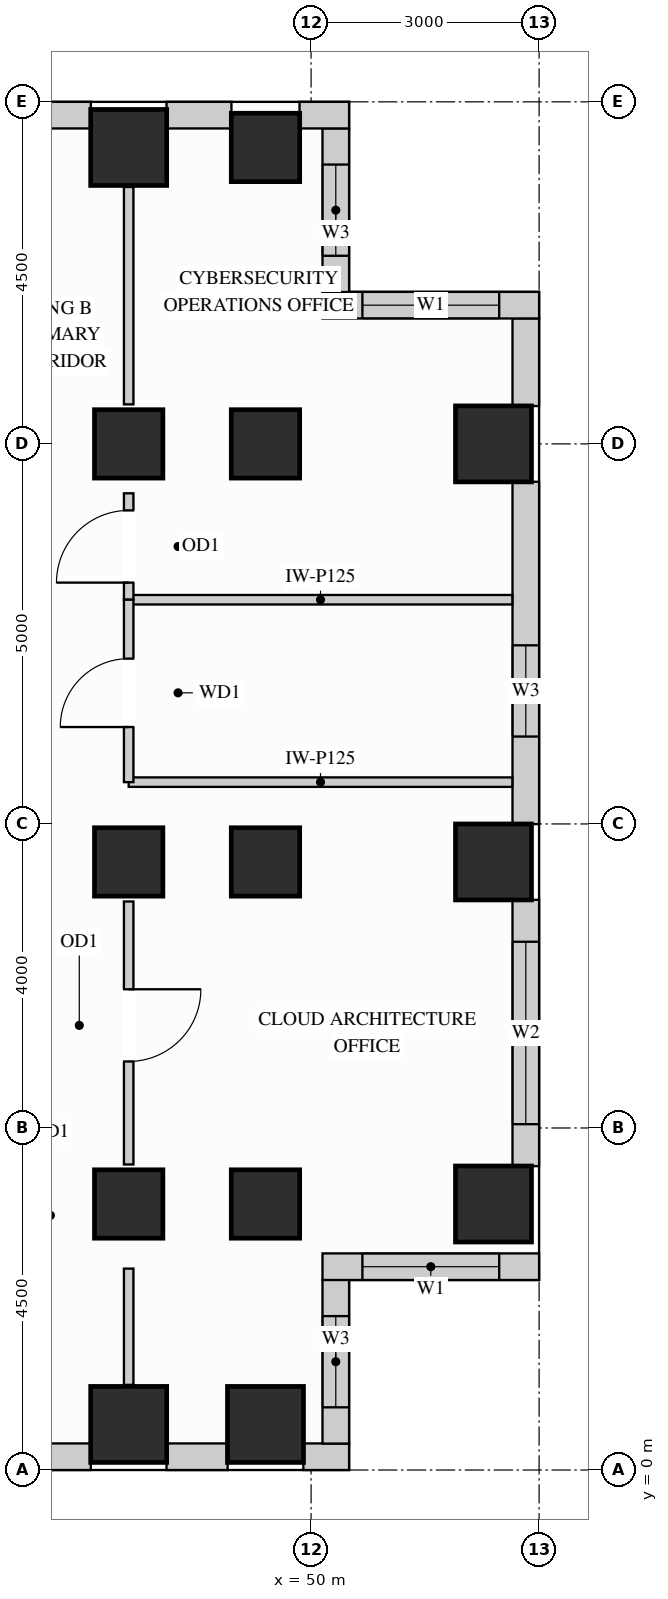
"""IFC4 building model, lengths in metres.
Left out: names, types, materials, properties, quantities, classifications, styles, units other than length and angle.
Written with IfcOpenShell. Run it as: python <this file> out.ifc"""

import sys

from ifc_helpers import new_model, si_unit, direction, frame, frame_2d, origin, origin_2d, place, context, subcontext, project, spatial, rectangle, extrude, source, transform, mapped, element, fill, save


model = new_model("IFC4")
c1 = context("Model", 3, precision=1e-05, world=origin(), true_north=direction((0.0, 1.0)))
c2 = subcontext(c1, "Body", "Model", "MODEL_VIEW")
j1 = project(units=[si_unit("LENGTHUNIT", "METRE"), si_unit("PLANEANGLEUNIT", "RADIAN")], contexts=[c1])
p1 = place(None, origin())
s1 = spatial("IfcSite", under=j1, at=p1, CompositionType="ELEMENT")
p2 = place(p1, origin())
s2 = spatial("IfcBuilding", under=s1, at=p2, CompositionType="ELEMENT")
p3 = place(p2, frame((0.0, 0.0, 143.1)))
s3 = spatial("IfcBuildingStorey", under=s2, at=p3, CompositionType="ELEMENT", Elevation=143.1)
m1 = source(origin(), c2, "Body", "SweptSolid", [
    extrude(rectangle(XDim=0.9, YDim=0.9, at=origin_2d()), origin(), (0.0, 0.0, 1.0), 3.4),
])
for number, where, z_axis, x_axis in (
    (1, (47.6, 13.5, 0.0), (0.0, 0.0, 1.0), (1.0, 0.0, 0.0)),
    (2, (47.6, 3.5, 0.0), (0.0, 0.0, 1.0), (1.0, 0.0, 0.0)),
    (3, (47.6, 8.0, 0.0), (0.0, 0.0, 1.0), (1.0, 0.0, 0.0)),
    (4, (49.4, 13.5, 0.0), (0.0, 0.0, 1.0), (1.0, 0.0, 0.0)),
    (5, (49.4, 17.4, 0.0), (0.0, 0.0, 1.0), (1.0, 0.0, 0.0)),
    (6, (49.4, 3.5, 0.0), (0.0, 0.0, 1.0), (1.0, 0.0, 0.0)),
    (7, (49.4, 8.0, 0.0), (0.0, 0.0, 1.0), (1.0, 0.0, 0.0)),
):
    element("IfcColumn", number, at=place(p3, frame(where, z_axis=z_axis, x_axis=x_axis)), inside=s3, PredefinedType="COLUMN", context=c2, shape_type="MappedRepresentation", body=[
        mapped(m1, transform((0.0, 0.0, 0.0), x_axis=(1.0, 0.0, 0.0), y_axis=(0.0, 1.0, 0.0), z_axis=(0.0, 0.0, 1.0))),
    ])
m2 = source(origin(), c2, "Body", "SweptSolid", [
    extrude(rectangle(XDim=1.0, YDim=1.0, at=origin_2d()), origin(), (0.0, 0.0, 1.0), 3.4),
])
for number, where, z_axis, x_axis in (
    (8, (47.6, 17.4, 0.0), (0.0, 0.0, 1.0), (1.0, 0.0, 0.0)),
    (9, (52.4, 13.5, 0.0), (0.0, 0.0, 1.0), (1.0, 0.0, 0.0)),
    (10, (52.4, 3.5, 0.0), (0.0, 0.0, 1.0), (1.0, 0.0, 0.0)),
    (11, (52.4, 8.0, 0.0), (0.0, 0.0, 1.0), (1.0, 0.0, 0.0)),
    (12, (47.6, 0.6, 0.0), (0.0, 0.0, 1.0), (1.0, 0.0, 0.0)),
    (13, (49.4, 0.6, 0.0), (0.0, 0.0, 1.0), (1.0, 0.0, 0.0)),
):
    element("IfcColumn", number, at=place(p3, frame(where, z_axis=z_axis, x_axis=x_axis)), inside=s3, PredefinedType="COLUMN", context=c2, shape_type="MappedRepresentation", body=[
        mapped(m2, transform((0.0, 0.0, 0.0), x_axis=(1.0, 0.0, 0.0), y_axis=(0.0, 1.0, 0.0), z_axis=(0.0, 0.0, 1.0))),
    ])
p4 = place(p3, frame((40.498, 0.175, 0.0), z_axis=(0.0, 0.0, 1.0), x_axis=(1.0, 0.0, 0.0)))
e14 = element("IfcWall", 14, at=p4, inside=s3, PredefinedType="SOLIDWALL", context=c2, shape_type="SweptSolid", body=[
    extrude(rectangle(XDim=6.604, YDim=0.35, at=frame_2d((3.302, 0.0))), origin(), (0.0, 0.0, 1.0), 2.612),
])
p5 = place(p4, frame((0.737, 0.0, 0.78)))
e15 = element("IfcOpeningElement", 15, at=p5, cuts=e14, PredefinedType="OPENING", context=c2, shape_type="SweptSolid", body=[
    extrude(rectangle(XDim=1.8, YDim=1.652, at=frame_2d((0.9, 0.826))), frame((0.0, 0.185, 0.0), z_axis=(0.0, -1.0, 0.0), x_axis=(1.0, 0.0, 0.0)), (0.0, 0.0, 1.0), 0.37),
])
p6 = place(p4, frame((2.955, 0.0, 0.78)))
e16 = element("IfcOpeningElement", 16, at=p6, cuts=e14, PredefinedType="OPENING", context=c2, shape_type="SweptSolid", body=[
    extrude(rectangle(XDim=1.8, YDim=1.652, at=frame_2d((0.9, 0.826))), frame((0.0, 0.185, 0.0), z_axis=(0.0, -1.0, 0.0), x_axis=(1.0, 0.0, 0.0)), (0.0, 0.0, 1.0), 0.37),
])
m3 = source(origin(), c2, "Body", "SweptSolid", [
    extrude(rectangle(XDim=0.804, YDim=0.35, at=frame_2d((0.402, 0.0))), origin(), (0.0, 0.0, 1.0), 3.385),
])
p7 = place(p3, frame((48.098, 0.175, 0.0), z_axis=(0.0, 0.0, 1.0), x_axis=(1.0, 0.0, 0.0)))
e17 = element("IfcWall", 17, at=p7, inside=s3, PredefinedType="SOLIDWALL", context=c2, shape_type="MappedRepresentation", body=[
    mapped(m3, transform((0.0, 0.0, 0.0), x_axis=(1.0, 0.0, 0.0), y_axis=(0.0, 1.0, 0.0), z_axis=(0.0, 0.0, 1.0))),
])
m4 = source(origin(), c2, "Body", "SweptSolid", [
    extrude(rectangle(XDim=0.602, YDim=0.35, at=frame_2d((0.301, 0.0))), origin(), (0.0, 0.0, 1.0), 3.385),
])
p8 = place(p3, frame((49.898, 0.175, 0.0), z_axis=(0.0, 0.0, 1.0), x_axis=(1.0, 0.0, 0.0)))
e18 = element("IfcWall", 18, at=p8, inside=s3, PredefinedType="SOLIDWALL", context=c2, shape_type="MappedRepresentation", body=[
    mapped(m4, transform((0.0, 0.0, 0.0), x_axis=(1.0, 0.0, 0.0), y_axis=(0.0, 1.0, 0.0), z_axis=(0.0, 0.0, 1.0))),
])
p9 = place(p3, frame((50.325, 0.348, 0.0), z_axis=(0.0, 0.0, 1.0), x_axis=(0.0, 1.0, 0.0)))
e19 = element("IfcWall", 19, at=p9, inside=s3, PredefinedType="SOLIDWALL", context=c2, shape_type="SweptSolid", body=[
    extrude(rectangle(XDim=2.154, YDim=0.35, at=frame_2d((1.077, 0.0))), origin(), (0.0, 0.0, 1.0), 3.385),
])
p10 = place(p9, frame((0.477, 0.0, 0.78)))
e20 = element("IfcOpeningElement", 20, at=p10, cuts=e19, PredefinedType="OPENING", context=c2, shape_type="SweptSolid", body=[
    extrude(rectangle(XDim=1.2, YDim=2.1, at=frame_2d((0.6, 1.05))), frame((0.0, 0.185, 0.0), z_axis=(0.0, -1.0, 0.0), x_axis=(1.0, 0.0, 0.0)), (0.0, 0.0, 1.0), 0.37),
])
p11 = place(p3, frame((50.15, 2.675, 0.0), z_axis=(0.0, 0.0, 1.0), x_axis=(1.0, 0.0, 0.0)))
e21 = element("IfcWall", 21, at=p11, inside=s3, PredefinedType="SOLIDWALL", context=c2, shape_type="SweptSolid", body=[
    extrude(rectangle(XDim=2.85, YDim=0.35, at=frame_2d((1.425, 0.0))), origin(), (0.0, 0.0, 1.0), 3.385),
])
p12 = place(p11, frame((0.525, 0.0, 0.78)))
e22 = element("IfcOpeningElement", 22, at=p12, cuts=e21, PredefinedType="OPENING", context=c2, shape_type="SweptSolid", body=[
    extrude(rectangle(XDim=1.8, YDim=2.1, at=frame_2d((0.9, 1.05))), frame((0.0, 0.185, 0.0), z_axis=(0.0, -1.0, 0.0), x_axis=(1.0, 0.0, 0.0)), (0.0, 0.0, 1.0), 0.37),
])
p13 = place(p3, frame((52.825, 3.998, 0.0), z_axis=(0.0, 0.0, 1.0), x_axis=(0.0, 1.0, 0.0)))
e23 = element("IfcWall", 23, at=p13, inside=s3, PredefinedType="SOLIDWALL", context=c2, shape_type="SweptSolid", body=[
    extrude(rectangle(XDim=3.504, YDim=0.35, at=frame_2d((1.752, 0.0))), origin(), (0.0, 0.0, 1.0), 2.612),
])
p14 = place(p13, frame((0.552, 0.0, 0.78)))
e24 = element("IfcOpeningElement", 24, at=p14, cuts=e23, PredefinedType="OPENING", context=c2, shape_type="SweptSolid", body=[
    extrude(rectangle(XDim=2.4, YDim=1.652, at=frame_2d((1.2, 0.826))), frame((0.0, 0.185, 0.0), z_axis=(0.0, -1.0, 0.0), x_axis=(1.0, 0.0, 0.0)), (0.0, 0.0, 1.0), 0.37),
])
p15 = place(p3, frame((52.825, 8.498, 0.0), z_axis=(0.0, 0.0, 1.0), x_axis=(0.0, 1.0, 0.0)))
e25 = element("IfcWall", 25, at=p15, inside=s3, PredefinedType="SOLIDWALL", context=c2, shape_type="SweptSolid", body=[
    extrude(rectangle(XDim=4.504, YDim=0.35, at=frame_2d((2.252, 0.0))), origin(), (0.0, 0.0, 1.0), 2.612),
])
p16 = place(p15, frame((1.152, 0.0, 0.78)))
e26 = element("IfcOpeningElement", 26, at=p16, cuts=e25, PredefinedType="OPENING", context=c2, shape_type="SweptSolid", body=[
    extrude(rectangle(XDim=1.2, YDim=1.652, at=frame_2d((0.6, 0.826))), frame((0.0, 0.185, 0.0), z_axis=(0.0, -1.0, 0.0), x_axis=(1.0, 0.0, 0.0)), (0.0, 0.0, 1.0), 0.37),
])
m5 = source(origin(), c2, "Body", "SweptSolid", [
    extrude(rectangle(XDim=1.154, YDim=0.35, at=frame_2d((0.577, 0.0))), origin(), (0.0, 0.0, 1.0), 3.385),
])
p17 = place(p3, frame((52.825, 13.998, 0.0), z_axis=(0.0, 0.0, 1.0), x_axis=(0.0, 1.0, 0.0)))
e27 = element("IfcWall", 27, at=p17, inside=s3, PredefinedType="SOLIDWALL", context=c2, shape_type="MappedRepresentation", body=[
    mapped(m5, transform((0.0, 0.0, 0.0), x_axis=(1.0, 0.0, 0.0), y_axis=(0.0, 1.0, 0.0), z_axis=(0.0, 0.0, 1.0))),
])
p18 = place(p3, frame((53.0, 15.325, 0.0), z_axis=(0.0, 0.0, 1.0), x_axis=(-1.0, 0.0, 0.0)))
e28 = element("IfcWall", 28, at=p18, inside=s3, PredefinedType="SOLIDWALL", context=c2, shape_type="SweptSolid", body=[
    extrude(rectangle(XDim=2.85, YDim=0.35, at=frame_2d((1.425, 0.0))), origin(), (0.0, 0.0, 1.0), 3.385),
])
p19 = place(p18, frame((0.525, 0.0, 0.78)))
e29 = element("IfcOpeningElement", 29, at=p19, cuts=e28, PredefinedType="OPENING", context=c2, shape_type="SweptSolid", body=[
    extrude(rectangle(XDim=1.8, YDim=2.1, at=frame_2d((0.9, 1.05))), frame((0.0, 0.185, 0.0), z_axis=(0.0, -1.0, 0.0), x_axis=(1.0, 0.0, 0.0)), (0.0, 0.0, 1.0), 0.37),
])
p20 = place(p3, frame((50.325, 15.498, 0.0), z_axis=(0.0, 0.0, 1.0), x_axis=(0.0, 1.0, 0.0)))
e30 = element("IfcWall", 30, at=p20, inside=s3, PredefinedType="SOLIDWALL", context=c2, shape_type="SweptSolid", body=[
    extrude(rectangle(XDim=2.154, YDim=0.35, at=frame_2d((1.077, 0.0))), origin(), (0.0, 0.0, 1.0), 3.385),
])
p21 = place(p20, frame((0.477, 0.0, 0.78)))
e31 = element("IfcOpeningElement", 31, at=p21, cuts=e30, PredefinedType="OPENING", context=c2, shape_type="SweptSolid", body=[
    extrude(rectangle(XDim=1.2, YDim=2.1, at=frame_2d((0.6, 1.05))), frame((0.0, 0.185, 0.0), z_axis=(0.0, -1.0, 0.0), x_axis=(1.0, 0.0, 0.0)), (0.0, 0.0, 1.0), 0.37),
])
m6 = source(origin(), c2, "Body", "SweptSolid", [
    extrude(rectangle(XDim=0.652, YDim=0.35, at=frame_2d((0.326, 0.0))), origin(), (0.0, 0.0, 1.0), 3.385),
])
p22 = place(p3, frame((50.5, 17.825, 0.0), z_axis=(0.0, 0.0, 1.0), x_axis=(-1.0, 0.0, 0.0)))
e32 = element("IfcWall", 32, at=p22, inside=s3, PredefinedType="SOLIDWALL", context=c2, shape_type="MappedRepresentation", body=[
    mapped(m6, transform((0.0, 0.0, 0.0), x_axis=(1.0, 0.0, 0.0), y_axis=(0.0, 1.0, 0.0), z_axis=(0.0, 0.0, 1.0))),
])
m7 = source(origin(), c2, "Body", "SweptSolid", [
    extrude(rectangle(XDim=0.854, YDim=0.35, at=frame_2d((0.427, 0.0))), origin(), (0.0, 0.0, 1.0), 3.385),
])
p23 = place(p3, frame((48.952, 17.825, 0.0), z_axis=(0.0, 0.0, 1.0), x_axis=(-1.0, 0.0, 0.0)))
e33 = element("IfcWall", 33, at=p23, inside=s3, PredefinedType="SOLIDWALL", context=c2, shape_type="MappedRepresentation", body=[
    mapped(m7, transform((0.0, 0.0, 0.0), x_axis=(1.0, 0.0, 0.0), y_axis=(0.0, 1.0, 0.0), z_axis=(0.0, 0.0, 1.0))),
])
p24 = place(p3, frame((47.102, 17.825, 0.0), z_axis=(0.0, 0.0, 1.0), x_axis=(-1.0, 0.0, 0.0)))
e34 = element("IfcWall", 34, at=p24, inside=s3, PredefinedType="SOLIDWALL", context=c2, shape_type="SweptSolid", body=[
    extrude(rectangle(XDim=6.604, YDim=0.35, at=frame_2d((3.302, 0.0))), origin(), (0.0, 0.0, 1.0), 2.612),
])
p25 = place(p24, frame((1.849, 0.0, 0.78)))
e35 = element("IfcOpeningElement", 35, at=p25, cuts=e34, PredefinedType="OPENING", context=c2, shape_type="SweptSolid", body=[
    extrude(rectangle(XDim=1.8, YDim=1.652, at=frame_2d((0.9, 0.826))), frame((0.0, 0.185, 0.0), z_axis=(0.0, -1.0, 0.0), x_axis=(1.0, 0.0, 0.0)), (0.0, 0.0, 1.0), 0.37),
])
p26 = place(p24, frame((4.067, 0.0, 0.78)))
e36 = element("IfcOpeningElement", 36, at=p26, cuts=e34, PredefinedType="OPENING", context=c2, shape_type="SweptSolid", body=[
    extrude(rectangle(XDim=1.8, YDim=1.652, at=frame_2d((0.9, 0.826))), frame((0.0, 0.185, 0.0), z_axis=(0.0, -1.0, 0.0), x_axis=(1.0, 0.0, 0.0)), (0.0, 0.0, 1.0), 0.37),
])
m8 = source(origin(), c2, "Body", "SweptSolid", [
    extrude(rectangle(XDim=5.048, YDim=0.125, at=frame_2d((2.524, 0.0))), origin(), (0.0, 0.0, 1.0), 3.385),
])
for number, where, z_axis, x_axis in (
    (37, (47.6, 11.45, 0.0), (0.0, 0.0, 1.0), (1.0, 0.0, 0.0)),
    (38, (47.6, 9.05, 0.0), (0.0, 0.0, 1.0), (1.0, 0.0, 0.0)),
):
    element("IfcWall", number, at=place(p3, frame(where, z_axis=z_axis, x_axis=x_axis)), inside=s3, PredefinedType="PARTITIONING", context=c2, shape_type="MappedRepresentation", body=[
        mapped(m8, transform((0.0, 0.0, 0.0), x_axis=(1.0, 0.0, 0.0), y_axis=(0.0, 1.0, 0.0), z_axis=(0.0, 0.0, 1.0))),
    ])
p27 = place(p3, frame((47.6, 4.02, 0.0), z_axis=(0.0, 0.0, 1.0), x_axis=(0.0, 1.0, 0.0)))
e39 = element("IfcWall", 39, at=p27, inside=s3, PredefinedType="PARTITIONING", context=c2, shape_type="SweptSolid", body=[
    extrude(rectangle(XDim=3.46, YDim=0.125, at=frame_2d((1.73, 0.0))), origin(), (0.0, 0.0, 1.0), 2.773),
])
p28 = place(p27, frame((1.355, 0.0, 0.0)))
e40 = element("IfcOpeningElement", 40, at=p28, cuts=e39, PredefinedType="OPENING", context=c2, shape_type="SweptSolid", body=[
    extrude(rectangle(XDim=0.95, YDim=2.15, at=frame_2d((0.475, 1.075))), frame((0.0, 0.073, 0.0), z_axis=(0.0, -1.0, 0.0), x_axis=(1.0, 0.0, 0.0)), (0.0, 0.0, 1.0), 0.145),
])
m9 = source(origin(), c2, "Body", "SweptSolid", [
    extrude(rectangle(XDim=1.53, YDim=0.125, at=frame_2d((0.765, 0.0))), origin(), (0.0, 0.0, 1.0), 2.773),
])
p29 = place(p3, frame((47.6, 1.12, 0.0), z_axis=(0.0, 0.0, 1.0), x_axis=(0.0, 1.0, 0.0)))
e41 = element("IfcWall", 41, at=p29, inside=s3, PredefinedType="PARTITIONING", context=c2, shape_type="MappedRepresentation", body=[
    mapped(m9, transform((0.0, 0.0, 0.0), x_axis=(1.0, 0.0, 0.0), y_axis=(0.0, 1.0, 0.0), z_axis=(0.0, 0.0, 1.0))),
])
p30 = place(p3, frame((47.6, 11.45, 0.0), z_axis=(0.0, 0.0, 1.0), x_axis=(0.0, 1.0, 0.0)))
e42 = element("IfcWall", 42, at=p30, inside=s3, PredefinedType="PARTITIONING", context=c2, shape_type="SweptSolid", body=[
    extrude(rectangle(XDim=1.4, YDim=0.125, at=frame_2d((0.7, 0.0))), origin(), (0.0, 0.0, 1.0), 2.773),
])
p31 = place(p30, frame((0.225, 0.0, 0.0)))
e43 = element("IfcOpeningElement", 43, at=p31, cuts=e42, PredefinedType="OPENING", context=c2, shape_type="SweptSolid", body=[
    extrude(rectangle(XDim=0.95, YDim=2.15, at=frame_2d((0.475, 1.075))), frame((0.0, 0.073, 0.0), z_axis=(0.0, -1.0, 0.0), x_axis=(1.0, 0.0, 0.0)), (0.0, 0.0, 1.0), 0.145),
])
m10 = source(origin(), c2, "Body", "SweptSolid", [
    extrude(rectangle(XDim=2.86, YDim=0.125, at=frame_2d((1.43, 0.0))), origin(), (0.0, 0.0, 1.0), 2.773),
])
p32 = place(p3, frame((47.6, 14.02, 0.0), z_axis=(0.0, 0.0, 1.0), x_axis=(0.0, 1.0, 0.0)))
e44 = element("IfcWall", 44, at=p32, inside=s3, PredefinedType="PARTITIONING", context=c2, shape_type="MappedRepresentation", body=[
    mapped(m10, transform((0.0, 0.0, 0.0), x_axis=(1.0, 0.0, 0.0), y_axis=(0.0, 1.0, 0.0), z_axis=(0.0, 0.0, 1.0))),
])
p33 = place(p3, frame((47.6, 9.05, 0.0), z_axis=(0.0, 0.0, 1.0), x_axis=(0.0, 1.0, 0.0)))
e45 = element("IfcWall", 45, at=p33, inside=s3, PredefinedType="PARTITIONING", context=c2, shape_type="SweptSolid", body=[
    extrude(rectangle(XDim=2.4, YDim=0.125, at=frame_2d((1.2, 0.0))), origin(), (0.0, 0.0, 1.0), 2.773),
])
p34 = place(p33, frame((0.725, 0.0, 0.0)))
e46 = element("IfcOpeningElement", 46, at=p34, cuts=e45, PredefinedType="OPENING", context=c2, shape_type="SweptSolid", body=[
    extrude(rectangle(XDim=0.9, YDim=2.15, at=frame_2d((0.45, 1.075))), frame((0.0, 0.073, 0.0), z_axis=(0.0, -1.0, 0.0), x_axis=(1.0, 0.0, 0.0)), (0.0, 0.0, 1.0), 0.145),
])
m11 = source(origin(), c2, "Body", "SweptSolid", [
    extrude(rectangle(XDim=0.95, YDim=2.15, at=frame_2d((0.475, 1.075))), frame((0.0, 0.025, 0.0), z_axis=(0.0, -1.0, 0.0), x_axis=(1.0, 0.0, 0.0)), (0.0, 0.0, 1.0), 0.05),
])
p35 = place(p28, origin())
e47 = element("IfcDoor", 47, at=p35, inside=s3, OperationType="SINGLE_SWING_RIGHT", PredefinedType="DOOR", context=c2, shape_type="MappedRepresentation", body=[
    mapped(m11, transform((0.0, 0.0, 0.0), x_axis=(1.0, 0.0, 0.0), y_axis=(0.0, 1.0, 0.0), z_axis=(0.0, 0.0, 1.0))),
])
fill(e40, e47)
p36 = place(p31, origin())
e48 = element("IfcDoor", 48, at=p36, inside=s3, OperationType="SINGLE_SWING_LEFT", PredefinedType="DOOR", context=c2, shape_type="MappedRepresentation", body=[
    mapped(m11, transform((0.0, 0.0, 0.0), x_axis=(1.0, 0.0, 0.0), y_axis=(0.0, 1.0, 0.0), z_axis=(0.0, 0.0, 1.0))),
])
fill(e43, e48)
m12 = source(origin(), c2, "Body", "SweptSolid", [
    extrude(rectangle(XDim=0.9, YDim=2.15, at=frame_2d((0.45, 1.075))), frame((0.0, 0.025, 0.0), z_axis=(0.0, -1.0, 0.0), x_axis=(1.0, 0.0, 0.0)), (0.0, 0.0, 1.0), 0.05),
])
p37 = place(p34, origin())
e49 = element("IfcDoor", 49, at=p37, inside=s3, OperationType="SINGLE_SWING_LEFT", PredefinedType="DOOR", context=c2, shape_type="MappedRepresentation", body=[
    mapped(m12, transform((0.0, 0.0, 0.0), x_axis=(1.0, 0.0, 0.0), y_axis=(0.0, 1.0, 0.0), z_axis=(0.0, 0.0, 1.0))),
])
fill(e46, e49)
m13 = source(origin(), c2, "Body", "SweptSolid", [
    extrude(rectangle(XDim=1.8, YDim=2.1, at=frame_2d((0.9, 1.05))), frame((0.0, 0.03, 0.0), z_axis=(0.0, -1.0, 0.0), x_axis=(1.0, 0.0, 0.0)), (0.0, 0.0, 1.0), 0.06),
])
p38 = place(p12, origin())
e50 = element("IfcWindow", 50, at=p38, inside=s3, PartitioningType="SINGLE_PANEL", PredefinedType="WINDOW", context=c2, shape_type="MappedRepresentation", body=[
    mapped(m13, transform((0.0, 0.0, 0.0), x_axis=(1.0, 0.0, 0.0), y_axis=(0.0, 1.0, 0.0), z_axis=(0.0, 0.0, 1.0))),
])
fill(e22, e50)
p39 = place(p19, origin())
e51 = element("IfcWindow", 51, at=p39, inside=s3, PartitioningType="SINGLE_PANEL", PredefinedType="WINDOW", context=c2, shape_type="MappedRepresentation", body=[
    mapped(m13, transform((0.0, 0.0, 0.0), x_axis=(1.0, 0.0, 0.0), y_axis=(0.0, 1.0, 0.0), z_axis=(0.0, 0.0, 1.0))),
])
fill(e29, e51)
m14 = source(origin(), c2, "Body", "SweptSolid", [
    extrude(rectangle(XDim=2.4, YDim=1.652, at=frame_2d((1.2, 0.826))), frame((0.0, 0.03, 0.0), z_axis=(0.0, -1.0, 0.0), x_axis=(1.0, 0.0, 0.0)), (0.0, 0.0, 1.0), 0.06),
])
p40 = place(p14, origin())
e52 = element("IfcWindow", 52, at=p40, inside=s3, PartitioningType="SINGLE_PANEL", PredefinedType="WINDOW", context=c2, shape_type="MappedRepresentation", body=[
    mapped(m14, transform((0.0, 0.0, 0.0), x_axis=(1.0, 0.0, 0.0), y_axis=(0.0, 1.0, 0.0), z_axis=(0.0, 0.0, 1.0))),
])
fill(e24, e52)
m15 = source(origin(), c2, "Body", "SweptSolid", [
    extrude(rectangle(XDim=1.2, YDim=2.1, at=frame_2d((0.6, 1.05))), frame((0.0, 0.03, 0.0), z_axis=(0.0, -1.0, 0.0), x_axis=(1.0, 0.0, 0.0)), (0.0, 0.0, 1.0), 0.06),
])
p41 = place(p10, origin())
e53 = element("IfcWindow", 53, at=p41, inside=s3, PartitioningType="SINGLE_PANEL", PredefinedType="WINDOW", context=c2, shape_type="MappedRepresentation", body=[
    mapped(m15, transform((0.0, 0.0, 0.0), x_axis=(1.0, 0.0, 0.0), y_axis=(0.0, 1.0, 0.0), z_axis=(0.0, 0.0, 1.0))),
])
fill(e20, e53)
m16 = source(origin(), c2, "Body", "SweptSolid", [
    extrude(rectangle(XDim=1.2, YDim=1.652, at=frame_2d((0.6, 0.826))), frame((0.0, 0.03, 0.0), z_axis=(0.0, -1.0, 0.0), x_axis=(1.0, 0.0, 0.0)), (0.0, 0.0, 1.0), 0.06),
])
p42 = place(p16, origin())
e54 = element("IfcWindow", 54, at=p42, inside=s3, PartitioningType="SINGLE_PANEL", PredefinedType="WINDOW", context=c2, shape_type="MappedRepresentation", body=[
    mapped(m16, transform((0.0, 0.0, 0.0), x_axis=(1.0, 0.0, 0.0), y_axis=(0.0, 1.0, 0.0), z_axis=(0.0, 0.0, 1.0))),
])
fill(e26, e54)
p43 = place(p21, origin())
e55 = element("IfcWindow", 55, at=p43, inside=s3, PartitioningType="SINGLE_PANEL", PredefinedType="WINDOW", context=c2, shape_type="MappedRepresentation", body=[
    mapped(m15, transform((0.0, 0.0, 0.0), x_axis=(1.0, 0.0, 0.0), y_axis=(0.0, 1.0, 0.0), z_axis=(0.0, 0.0, 1.0))),
])
fill(e31, e55)
save(model, sys.argv[1])
